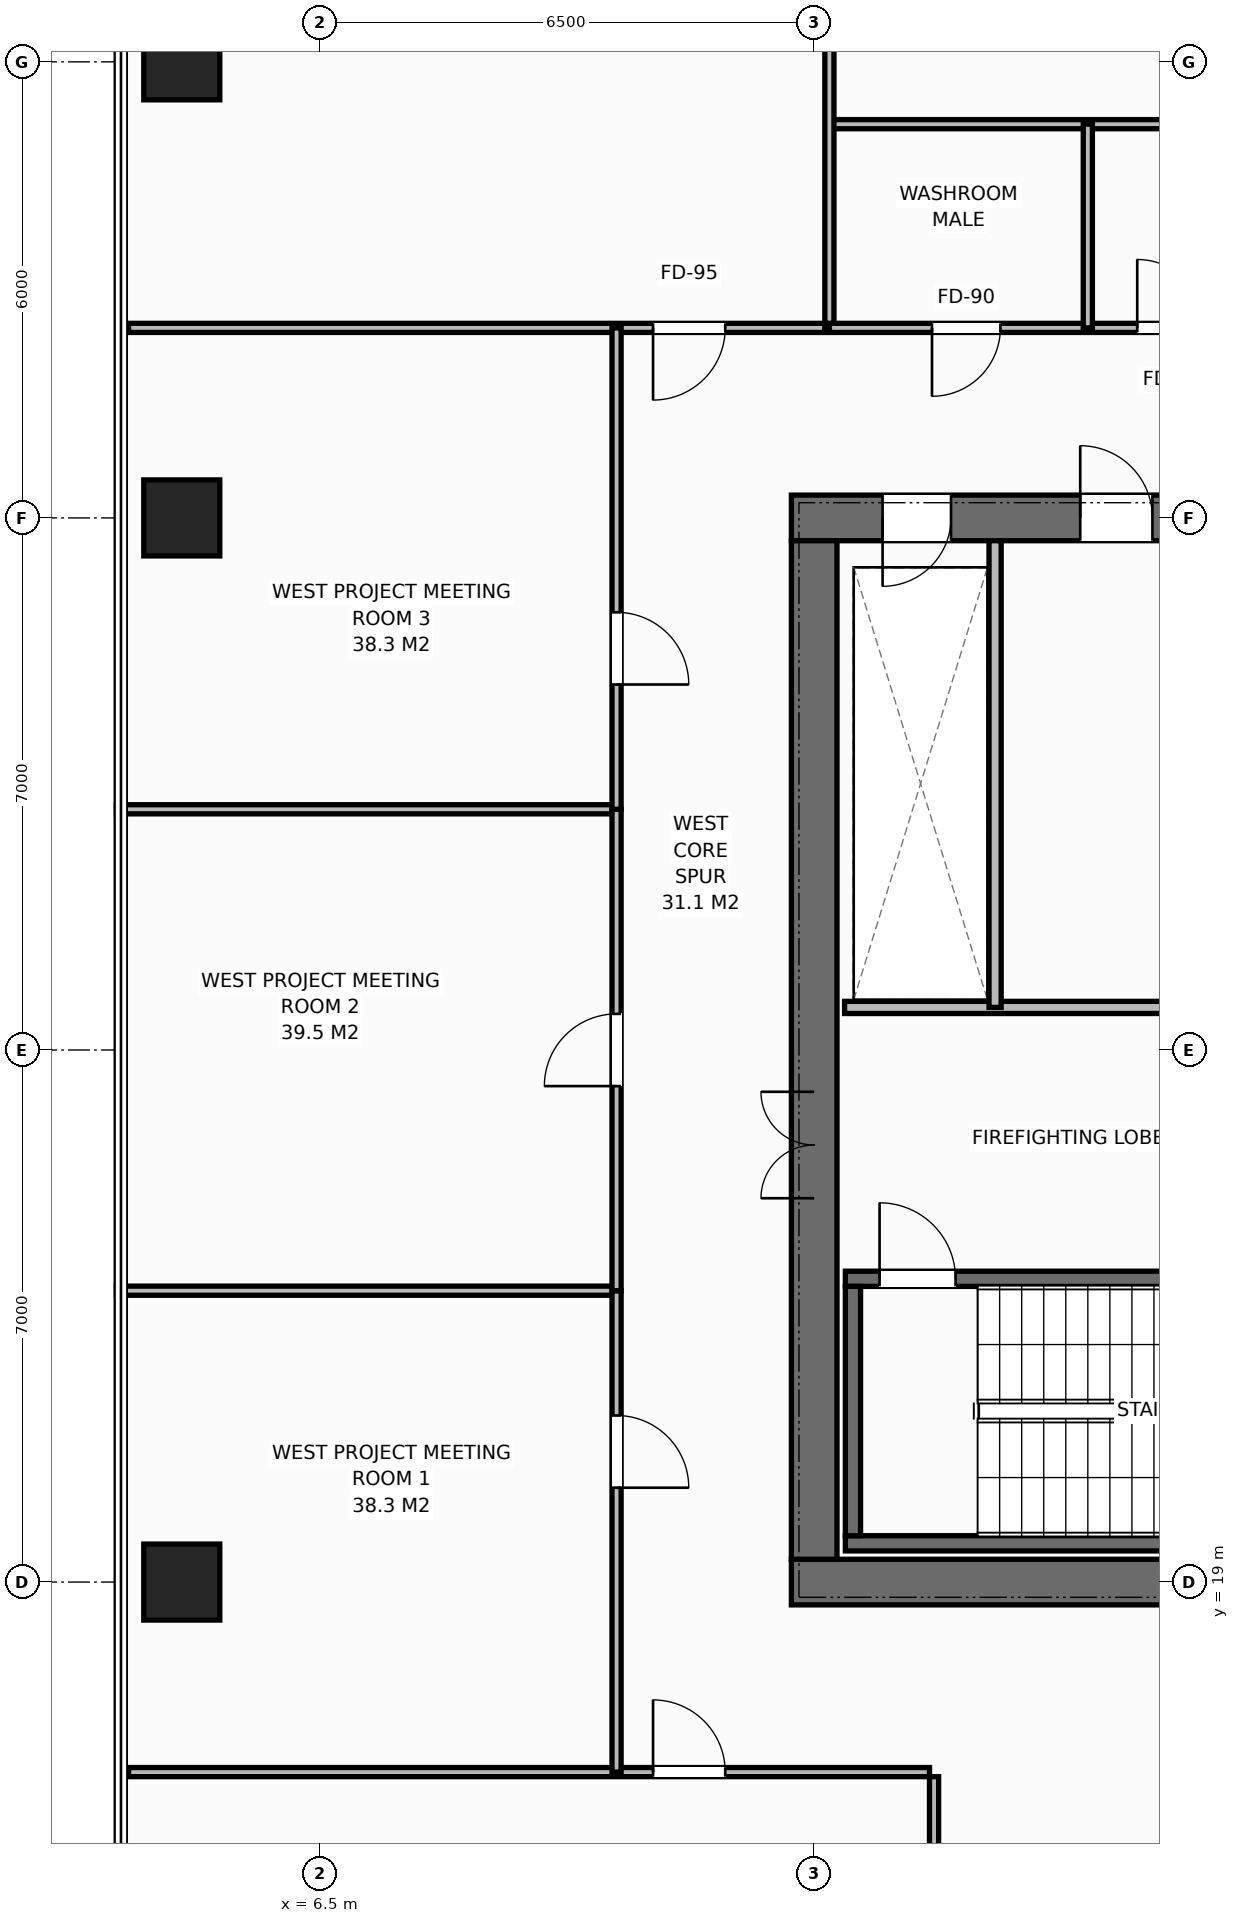
"""IFC4 building model, lengths in metres.
Left out: names, types, materials, properties, quantities, classifications, styles, units other than length and angle.
Written with IfcOpenShell. Run it as: python <this file> out.ifc"""

import sys

from ifc_helpers import new_model, si_unit, direction, frame, frame_2d, origin, origin_2d, place, context, subcontext, project, spatial, rectangle, extrude, element, fill, save


model = new_model("IFC4")
c1 = context("Model", 3, precision=1e-05, world=origin(), true_north=direction((0.0, 1.0)))
c2 = subcontext(c1, "Body", "Model", "MODEL_VIEW")
j1 = project(units=[si_unit("LENGTHUNIT", "METRE"), si_unit("PLANEANGLEUNIT", "RADIAN")], contexts=[c1])
p1 = place(None, origin())
s1 = spatial("IfcSite", under=j1, at=p1, CompositionType="ELEMENT")
p2 = place(p1, origin())
s2 = spatial("IfcBuilding", under=s1, at=p2, CompositionType="ELEMENT")
p3 = place(p2, frame((0.0, 0.0, 193.6)))
s3 = spatial("IfcBuildingStorey", under=s2, at=p3, CompositionType="ELEMENT", Elevation=193.6)
p4 = place(p3, frame((12.7, 19.0, 0.0), z_axis=(0.0, 0.0, 1.0), x_axis=(1.0, 0.0, 0.0)))
e1 = element("IfcWall", 1, at=p4, inside=s3, PredefinedType="SHEAR", context=c2, shape_type="SweptSolid", body=[
    extrude(rectangle(XDim=13.6, YDim=0.6, at=frame_2d((6.8, 0.0))), origin(), (0.0, 0.0, 1.0), 3.8),
])
p5 = place(p4, frame((9.18, 0.0, 0.0)))
e2 = element("IfcOpeningElement", 2, at=p5, cuts=e1, PredefinedType="OPENING", context=c2, shape_type="SweptSolid", body=[
    extrude(rectangle(XDim=1.4, YDim=2.2, at=frame_2d((0.7, 1.1))), frame((0.0, 0.31, 0.0), z_axis=(0.0, -1.0, 0.0), x_axis=(1.0, 0.0, 0.0)), (0.0, 0.0, 1.0), 0.62),
])
p6 = place(p3, frame((12.7, 33.0, 0.0), z_axis=(0.0, 0.0, 1.0), x_axis=(1.0, 0.0, 0.0)))
e3 = element("IfcWall", 3, at=p6, inside=s3, PredefinedType="SHEAR", context=c2, shape_type="SweptSolid", body=[
    extrude(rectangle(XDim=13.6, YDim=0.6, at=frame_2d((6.8, 0.0))), origin(), (0.0, 0.0, 1.0), 3.8),
])
p7 = place(p6, frame((1.2, 0.0, 0.0)))
e4 = element("IfcOpeningElement", 4, at=p7, cuts=e3, PredefinedType="OPENING", context=c2, shape_type="SweptSolid", body=[
    extrude(rectangle(XDim=0.9, YDim=2.15, at=frame_2d((0.45, 1.075))), frame((0.0, 0.31, 0.0), z_axis=(0.0, -1.0, 0.0), x_axis=(1.0, 0.0, 0.0)), (0.0, 0.0, 1.0), 0.62),
])
p8 = place(p6, frame((3.8, 0.0, 0.0)))
e5 = element("IfcOpeningElement", 5, at=p8, cuts=e3, PredefinedType="OPENING", context=c2, shape_type="SweptSolid", body=[
    extrude(rectangle(XDim=0.95, YDim=2.15, at=frame_2d((0.475, 1.075))), frame((0.0, 0.31, 0.0), z_axis=(0.0, -1.0, 0.0), x_axis=(1.0, 0.0, 0.0)), (0.0, 0.0, 1.0), 0.62),
])
p9 = place(p6, frame((6.8, 0.0, 0.0)))
e6 = element("IfcOpeningElement", 6, at=p9, cuts=e3, PredefinedType="OPENING", context=c2, shape_type="SweptSolid", body=[
    extrude(rectangle(XDim=0.95, YDim=2.15, at=frame_2d((0.475, 1.075))), frame((0.0, 0.31, 0.0), z_axis=(0.0, -1.0, 0.0), x_axis=(1.0, 0.0, 0.0)), (0.0, 0.0, 1.0), 0.62),
])
p10 = place(p6, frame((9.18, 0.0, 0.0)))
e7 = element("IfcOpeningElement", 7, at=p10, cuts=e3, PredefinedType="OPENING", context=c2, shape_type="SweptSolid", body=[
    extrude(rectangle(XDim=1.4, YDim=2.2, at=frame_2d((0.7, 1.1))), frame((0.0, 0.31, 0.0), z_axis=(0.0, -1.0, 0.0), x_axis=(1.0, 0.0, 0.0)), (0.0, 0.0, 1.0), 0.62),
])
p11 = place(p3, frame((13.0, 19.3, 0.0), z_axis=(0.0, 0.0, 1.0), x_axis=(0.0, 1.0, 0.0)))
e8 = element("IfcWall", 8, at=p11, inside=s3, PredefinedType="SHEAR", context=c2, shape_type="SweptSolid", body=[
    extrude(rectangle(XDim=13.4, YDim=0.6, at=frame_2d((6.7, 0.0))), origin(), (0.0, 0.0, 1.0), 3.8),
])
p12 = place(p11, frame((4.75, 0.0, 0.0)))
e9 = element("IfcOpeningElement", 9, at=p12, cuts=e8, PredefinedType="OPENING", context=c2, shape_type="SweptSolid", body=[
    extrude(rectangle(XDim=1.4, YDim=2.2, at=frame_2d((0.7, 1.1))), frame((0.0, 0.31, 0.0), z_axis=(0.0, -1.0, 0.0), x_axis=(1.0, 0.0, 0.0)), (0.0, 0.0, 1.0), 0.62),
])
p13 = place(p3, frame((13.41, 19.51, 0.0), z_axis=(0.0, 0.0, 1.0), x_axis=(1.0, 0.0, 0.0)))
e10 = element("IfcWall", 10, at=p13, inside=s3, PredefinedType="SHEAR", context=c2, shape_type="SweptSolid", body=[
    extrude(rectangle(XDim=8.43, YDim=0.2, at=frame_2d((4.215, 0.0))), origin(), (0.0, 0.0, 1.0), 3.8),
])
p14 = place(p3, frame((13.41, 22.99, 0.0), z_axis=(0.0, 0.0, 1.0), x_axis=(1.0, 0.0, 0.0)))
e11 = element("IfcWall", 11, at=p14, inside=s3, PredefinedType="SHEAR", context=c2, shape_type="SweptSolid", body=[
    extrude(rectangle(XDim=8.43, YDim=0.2, at=frame_2d((4.215, 0.0))), origin(), (0.0, 0.0, 1.0), 3.8),
])
p15 = place(p14, frame((0.45, 0.0, 0.0)))
e12 = element("IfcOpeningElement", 12, at=p15, cuts=e11, PredefinedType="OPENING", context=c2, shape_type="SweptSolid", body=[
    extrude(rectangle(XDim=1.0, YDim=2.15, at=frame_2d((0.5, 1.075))), frame((0.0, 0.11, 0.0), z_axis=(0.0, -1.0, 0.0), x_axis=(1.0, 0.0, 0.0)), (0.0, 0.0, 1.0), 0.22),
])
p16 = place(p3, frame((13.51, 19.61, 0.0), z_axis=(0.0, 0.0, 1.0), x_axis=(0.0, 1.0, 0.0)))
e13 = element("IfcWall", 13, at=p16, inside=s3, PredefinedType="SHEAR", context=c2, shape_type="SweptSolid", body=[
    extrude(rectangle(XDim=3.28, YDim=0.2, at=frame_2d((1.64, 0.0))), origin(), (0.0, 0.0, 1.0), 3.8),
])
for number, where, z_axis, x_axis in (
    (14, (4.68, 19.0, 0.0), (0.0, 0.0, 1.0), (1.0, 0.0, 0.0)),
    (15, (4.68, 33.0, 0.0), (0.0, 0.0, 1.0), (1.0, 0.0, 0.0)),
    (16, (4.68, 39.0, 0.0), (0.0, 0.0, 1.0), (1.0, 0.0, 0.0)),
):
    element("IfcColumn", number, at=place(p3, frame(where, z_axis=z_axis, x_axis=x_axis)), inside=s3, PredefinedType="COLUMN", context=c2, shape_type="SweptSolid", body=[
        extrude(rectangle(XDim=1.0, YDim=1.0, at=origin_2d()), origin(), (0.0, 0.0, 1.0), 3.8),
    ])
p17 = place(p3, frame((13.4, 26.56, 0.0), z_axis=(0.0, 0.0, 1.0), x_axis=(1.0, 0.0, 0.0)))
e17 = element("IfcWall", 17, at=p17, inside=s3, PredefinedType="STANDARD", context=c2, shape_type="SweptSolid", body=[
    extrude(rectangle(XDim=8.34, YDim=0.16, at=frame_2d((4.17, 0.0))), origin(), (0.0, 0.0, 1.0), 3.52),
])
p18 = place(p3, frame((15.38, 26.56, 0.0), z_axis=(0.0, 0.0, 1.0), x_axis=(0.0, 1.0, 0.0)))
e18 = element("IfcWall", 18, at=p18, inside=s3, PredefinedType="STANDARD", context=c2, shape_type="SweptSolid", body=[
    extrude(rectangle(XDim=6.14, YDim=0.16, at=frame_2d((3.07, 0.0))), origin(), (0.0, 0.0, 1.0), 3.52),
])
p19 = place(p3, frame((13.2, 35.5, 0.0), z_axis=(0.0, 0.0, 1.0), x_axis=(1.0, 0.0, 0.0)))
e19 = element("IfcWall", 19, at=p19, inside=s3, PredefinedType="PARTITIONING", context=c2, shape_type="SweptSolid", body=[
    extrude(rectangle(XDim=13.16, YDim=0.12, at=frame_2d((6.58, 0.0))), origin(), (0.0, 0.0, 1.0), 3.52),
])
p20 = place(p19, frame((1.35, 0.0, 0.0)))
e20 = element("IfcOpeningElement", 20, at=p20, cuts=e19, PredefinedType="OPENING", context=c2, shape_type="SweptSolid", body=[
    extrude(rectangle(XDim=0.9, YDim=2.15, at=frame_2d((0.45, 1.075))), frame((0.0, 0.07, 0.0), z_axis=(0.0, -1.0, 0.0), x_axis=(1.0, 0.0, 0.0)), (0.0, 0.0, 1.0), 0.14),
])
p21 = place(p19, frame((4.05, 0.0, 0.0)))
e21 = element("IfcOpeningElement", 21, at=p21, cuts=e19, PredefinedType="OPENING", context=c2, shape_type="SweptSolid", body=[
    extrude(rectangle(XDim=0.9, YDim=2.15, at=frame_2d((0.45, 1.075))), frame((0.0, 0.07, 0.0), z_axis=(0.0, -1.0, 0.0), x_axis=(1.0, 0.0, 0.0)), (0.0, 0.0, 1.0), 0.14),
])
p22 = place(p19, frame((8.25, 0.0, 0.0)))
e22 = element("IfcOpeningElement", 22, at=p22, cuts=e19, PredefinedType="OPENING", context=c2, shape_type="SweptSolid", body=[
    extrude(rectangle(XDim=0.9, YDim=2.15, at=frame_2d((0.45, 1.075))), frame((0.0, 0.07, 0.0), z_axis=(0.0, -1.0, 0.0), x_axis=(1.0, 0.0, 0.0)), (0.0, 0.0, 1.0), 0.14),
])
p23 = place(p19, frame((11.0, 0.0, 0.0)))
e23 = element("IfcOpeningElement", 23, at=p23, cuts=e19, PredefinedType="OPENING", context=c2, shape_type="SweptSolid", body=[
    extrude(rectangle(XDim=0.95, YDim=2.15, at=frame_2d((0.475, 1.075))), frame((0.0, 0.07, 0.0), z_axis=(0.0, -1.0, 0.0), x_axis=(1.0, 0.0, 0.0)), (0.0, 0.0, 1.0), 0.14),
])
p24 = place(p3, frame((13.2, 38.18, 0.0), z_axis=(0.0, 0.0, 1.0), x_axis=(1.0, 0.0, 0.0)))
e24 = element("IfcWall", 24, at=p24, inside=s3, PredefinedType="PARTITIONING", context=c2, shape_type="SweptSolid", body=[
    extrude(rectangle(XDim=13.16, YDim=0.12, at=frame_2d((6.58, 0.0))), origin(), (0.0, 0.0, 1.0), 3.52),
])
p25 = place(p3, frame((16.6, 35.5, 0.0), z_axis=(0.0, 0.0, 1.0), x_axis=(0.0, 1.0, 0.0)))
e25 = element("IfcWall", 25, at=p25, inside=s3, PredefinedType="PARTITIONING", context=c2, shape_type="SweptSolid", body=[
    extrude(rectangle(XDim=2.68, YDim=0.12, at=frame_2d((1.34, 0.0))), origin(), (0.0, 0.0, 1.0), 3.52),
])
p26 = place(p3, frame((13.2, 35.56, 0.0), z_axis=(0.0, 0.0, 1.0), x_axis=(0.0, 1.0, 0.0)))
e26 = element("IfcWall", 26, at=p26, inside=s3, PredefinedType="PARTITIONING", context=c2, shape_type="SweptSolid", body=[
    extrude(rectangle(XDim=13.02, YDim=0.12, at=frame_2d((6.51, 0.0))), origin(), (0.0, 0.0, 1.0), 2.72),
])
p27 = place(p3, frame((3.98, 35.5, 0.0), z_axis=(0.0, 0.0, 1.0), x_axis=(1.0, 0.0, 0.0)))
e27 = element("IfcWall", 27, at=p27, inside=s3, PredefinedType="PARTITIONING", context=c2, shape_type="SweptSolid", body=[
    extrude(rectangle(XDim=9.16, YDim=0.12, at=frame_2d((4.58, 0.0))), origin(), (0.0, 0.0, 1.0), 3.52),
])
p28 = place(p27, frame((6.9, 0.0, 0.0)))
e28 = element("IfcOpeningElement", 28, at=p28, cuts=e27, PredefinedType="OPENING", context=c2, shape_type="SweptSolid", body=[
    extrude(rectangle(XDim=0.95, YDim=2.15, at=frame_2d((0.475, 1.075))), frame((0.0, 0.07, 0.0), z_axis=(0.0, -1.0, 0.0), x_axis=(1.0, 0.0, 0.0)), (0.0, 0.0, 1.0), 0.14),
])
p29 = place(p3, frame((14.577, 3.42, 0.0), z_axis=(0.0, 0.0, 1.0), x_axis=(0.0, 1.0, 0.0)))
e29 = element("IfcWall", 29, at=p29, inside=s3, PredefinedType="PARTITIONING", context=c2, shape_type="SweptSolid", body=[
    extrude(rectangle(XDim=13.02, YDim=0.12, at=frame_2d((6.51, 0.0))), origin(), (0.0, 0.0, 1.0), 3.52),
])
p30 = place(p3, frame((3.98, 16.5, 0.0), z_axis=(0.0, 0.0, 1.0), x_axis=(1.0, 0.0, 0.0)))
e30 = element("IfcWall", 30, at=p30, inside=s3, PredefinedType="PARTITIONING", context=c2, shape_type="SweptSolid", body=[
    extrude(rectangle(XDim=10.537, YDim=0.12, at=frame_2d((5.269, 0.0))), origin(), (0.0, 0.0, 1.0), 3.52),
])
p31 = place(p30, frame((6.9, 0.0, 0.0)))
e31 = element("IfcOpeningElement", 31, at=p31, cuts=e30, PredefinedType="OPENING", context=c2, shape_type="SweptSolid", body=[
    extrude(rectangle(XDim=0.95, YDim=2.15, at=frame_2d((0.475, 1.075))), frame((0.0, 0.07, 0.0), z_axis=(0.0, -1.0, 0.0), x_axis=(1.0, 0.0, 0.0)), (0.0, 0.0, 1.0), 0.14),
])
p32 = place(p3, frame((3.82, 22.833, 0.0), z_axis=(0.0, 0.0, 1.0), x_axis=(1.0, 0.0, 0.0)))
e32 = element("IfcWall", 32, at=p32, inside=s3, PredefinedType="PARTITIONING", context=c2, shape_type="SweptSolid", body=[
    extrude(rectangle(XDim=6.58, YDim=0.12, at=frame_2d((3.29, 0.0))), origin(), (0.0, 0.0, 1.0), 3.52),
])
p33 = place(p3, frame((10.4, 16.5, 0.0), z_axis=(0.0, 0.0, 1.0), x_axis=(0.0, 1.0, 0.0)))
e33 = element("IfcWall", 33, at=p33, inside=s3, PredefinedType="PARTITIONING", context=c2, shape_type="SweptSolid", body=[
    extrude(rectangle(XDim=6.333, YDim=0.12, at=frame_2d((3.167, 0.0))), origin(), (0.0, 0.0, 1.0), 3.52),
])
p34 = place(p33, frame((3.742, 0.0, 0.0)))
e34 = element("IfcOpeningElement", 34, at=p34, cuts=e33, PredefinedType="OPENING", context=c2, shape_type="SweptSolid", body=[
    extrude(rectangle(XDim=0.95, YDim=2.15, at=frame_2d((0.475, 1.075))), frame((0.0, 0.07, 0.0), z_axis=(0.0, -1.0, 0.0), x_axis=(1.0, 0.0, 0.0)), (0.0, 0.0, 1.0), 0.14),
])
p35 = place(p3, frame((3.82, 29.167, 0.0), z_axis=(0.0, 0.0, 1.0), x_axis=(1.0, 0.0, 0.0)))
e35 = element("IfcWall", 35, at=p35, inside=s3, PredefinedType="PARTITIONING", context=c2, shape_type="SweptSolid", body=[
    extrude(rectangle(XDim=6.58, YDim=0.12, at=frame_2d((3.29, 0.0))), origin(), (0.0, 0.0, 1.0), 3.52),
])
p36 = place(p3, frame((10.4, 22.833, 0.0), z_axis=(0.0, 0.0, 1.0), x_axis=(0.0, 1.0, 0.0)))
e36 = element("IfcWall", 36, at=p36, inside=s3, PredefinedType="PARTITIONING", context=c2, shape_type="SweptSolid", body=[
    extrude(rectangle(XDim=6.333, YDim=0.12, at=frame_2d((3.167, 0.0))), origin(), (0.0, 0.0, 1.0), 3.52),
])
p37 = place(p36, frame((2.692, 0.0, 0.0)))
e37 = element("IfcOpeningElement", 37, at=p37, cuts=e36, PredefinedType="OPENING", context=c2, shape_type="SweptSolid", body=[
    extrude(rectangle(XDim=0.95, YDim=2.15, at=frame_2d((0.475, 1.075))), frame((0.0, 0.07, 0.0), z_axis=(0.0, -1.0, 0.0), x_axis=(1.0, 0.0, 0.0)), (0.0, 0.0, 1.0), 0.14),
])
p38 = place(p3, frame((10.4, 29.167, 0.0), z_axis=(0.0, 0.0, 1.0), x_axis=(0.0, 1.0, 0.0)))
e38 = element("IfcWall", 38, at=p38, inside=s3, PredefinedType="PARTITIONING", context=c2, shape_type="SweptSolid", body=[
    extrude(rectangle(XDim=6.333, YDim=0.12, at=frame_2d((3.167, 0.0))), origin(), (0.0, 0.0, 1.0), 3.52),
])
p39 = place(p38, frame((1.642, 0.0, 0.0)))
e39 = element("IfcOpeningElement", 39, at=p39, cuts=e38, PredefinedType="OPENING", context=c2, shape_type="SweptSolid", body=[
    extrude(rectangle(XDim=0.95, YDim=2.15, at=frame_2d((0.475, 1.075))), frame((0.0, 0.07, 0.0), z_axis=(0.0, -1.0, 0.0), x_axis=(1.0, 0.0, 0.0)), (0.0, 0.0, 1.0), 0.14),
])
p40 = place(p15, origin())
e40 = element("IfcDoor", 40, at=p40, inside=s3, OperationType="SINGLE_SWING_LEFT", PredefinedType="DOOR", context=c2, shape_type="SweptSolid", body=[
    extrude(rectangle(XDim=1.0, YDim=2.15, at=frame_2d((0.5, 1.075))), frame((0.0, 0.025, 0.0), z_axis=(0.0, -1.0, 0.0), x_axis=(1.0, 0.0, 0.0)), (0.0, 0.0, 1.0), 0.05),
])
fill(e12, e40)
p41 = place(p12, origin())
e41 = element("IfcDoor", 41, at=p41, inside=s3, OperationType="DOUBLE_DOOR_SINGLE_SWING", PredefinedType="DOOR", context=c2, shape_type="SweptSolid", body=[
    extrude(rectangle(XDim=1.4, YDim=2.2, at=frame_2d((0.7, 1.1))), frame((0.0, 0.025, 0.0), z_axis=(0.0, -1.0, 0.0), x_axis=(1.0, 0.0, 0.0)), (0.0, 0.0, 1.0), 0.05),
])
fill(e9, e41)
p42 = place(p7, origin())
e42 = element("IfcDoor", 42, at=p42, inside=s3, OperationType="SINGLE_SWING_RIGHT", PredefinedType="DOOR", context=c2, shape_type="SweptSolid", body=[
    extrude(rectangle(XDim=0.9, YDim=2.15, at=frame_2d((0.45, 1.075))), frame((0.0, -0.025, 0.0), z_axis=(0.0, -1.0, 0.0), x_axis=(1.0, 0.0, 0.0)), (0.0, 0.0, 1.0), 0.05),
])
fill(e4, e42)
p43 = place(p8, origin())
e43 = element("IfcDoor", 43, at=p43, inside=s3, OperationType="SINGLE_SWING_LEFT", PredefinedType="DOOR", context=c2, shape_type="SweptSolid", body=[
    extrude(rectangle(XDim=0.95, YDim=2.15, at=frame_2d((0.475, 1.075))), frame((0.0, -0.025, 0.0), z_axis=(0.0, -1.0, 0.0), x_axis=(1.0, 0.0, 0.0)), (0.0, 0.0, 1.0), 0.05),
])
fill(e5, e43)
p44 = place(p20, origin())
e44 = element("IfcDoor", 44, at=p44, inside=s3, OperationType="SINGLE_SWING_RIGHT", PredefinedType="DOOR", context=c2, shape_type="SweptSolid", body=[
    extrude(rectangle(XDim=0.9, YDim=2.15, at=frame_2d((0.45, 1.075))), frame((0.0, 0.025, 0.0), z_axis=(0.0, -1.0, 0.0), x_axis=(1.0, 0.0, 0.0)), (0.0, 0.0, 1.0), 0.05),
])
fill(e20, e44)
p45 = place(p21, origin())
e45 = element("IfcDoor", 45, at=p45, inside=s3, OperationType="SINGLE_SWING_LEFT", PredefinedType="DOOR", context=c2, shape_type="SweptSolid", body=[
    extrude(rectangle(XDim=0.9, YDim=2.15, at=frame_2d((0.45, 1.075))), frame((0.0, 0.025, 0.0), z_axis=(0.0, -1.0, 0.0), x_axis=(1.0, 0.0, 0.0)), (0.0, 0.0, 1.0), 0.05),
])
fill(e21, e45)
p46 = place(p28, origin())
e46 = element("IfcDoor", 46, at=p46, inside=s3, OperationType="SINGLE_SWING_RIGHT", PredefinedType="DOOR", context=c2, shape_type="SweptSolid", body=[
    extrude(rectangle(XDim=0.95, YDim=2.15, at=frame_2d((0.475, 1.075))), frame((0.0, 0.025, 0.0), z_axis=(0.0, -1.0, 0.0), x_axis=(1.0, 0.0, 0.0)), (0.0, 0.0, 1.0), 0.05),
])
fill(e28, e46)
p47 = place(p31, origin())
e47 = element("IfcDoor", 47, at=p47, inside=s3, OperationType="SINGLE_SWING_LEFT", PredefinedType="DOOR", context=c2, shape_type="SweptSolid", body=[
    extrude(rectangle(XDim=0.95, YDim=2.15, at=frame_2d((0.475, 1.075))), frame((0.0, 0.025, 0.0), z_axis=(0.0, -1.0, 0.0), x_axis=(1.0, 0.0, 0.0)), (0.0, 0.0, 1.0), 0.05),
])
fill(e31, e47)
p48 = place(p34, origin())
e48 = element("IfcDoor", 48, at=p48, inside=s3, OperationType="SINGLE_SWING_RIGHT", PredefinedType="DOOR", context=c2, shape_type="SweptSolid", body=[
    extrude(rectangle(XDim=0.95, YDim=2.15, at=frame_2d((0.475, 1.075))), frame((0.0, 0.025, 0.0), z_axis=(0.0, -1.0, 0.0), x_axis=(1.0, 0.0, 0.0)), (0.0, 0.0, 1.0), 0.05),
])
fill(e34, e48)
p49 = place(p37, origin())
e49 = element("IfcDoor", 49, at=p49, inside=s3, OperationType="SINGLE_SWING_LEFT", PredefinedType="DOOR", context=c2, shape_type="SweptSolid", body=[
    extrude(rectangle(XDim=0.95, YDim=2.15, at=frame_2d((0.475, 1.075))), frame((0.0, 0.025, 0.0), z_axis=(0.0, -1.0, 0.0), x_axis=(1.0, 0.0, 0.0)), (0.0, 0.0, 1.0), 0.05),
])
fill(e37, e49)
p50 = place(p39, origin())
e50 = element("IfcDoor", 50, at=p50, inside=s3, OperationType="SINGLE_SWING_RIGHT", PredefinedType="DOOR", context=c2, shape_type="SweptSolid", body=[
    extrude(rectangle(XDim=0.95, YDim=2.15, at=frame_2d((0.475, 1.075))), frame((0.0, 0.025, 0.0), z_axis=(0.0, -1.0, 0.0), x_axis=(1.0, 0.0, 0.0)), (0.0, 0.0, 1.0), 0.05),
])
fill(e39, e50)
save(model, sys.argv[1])
